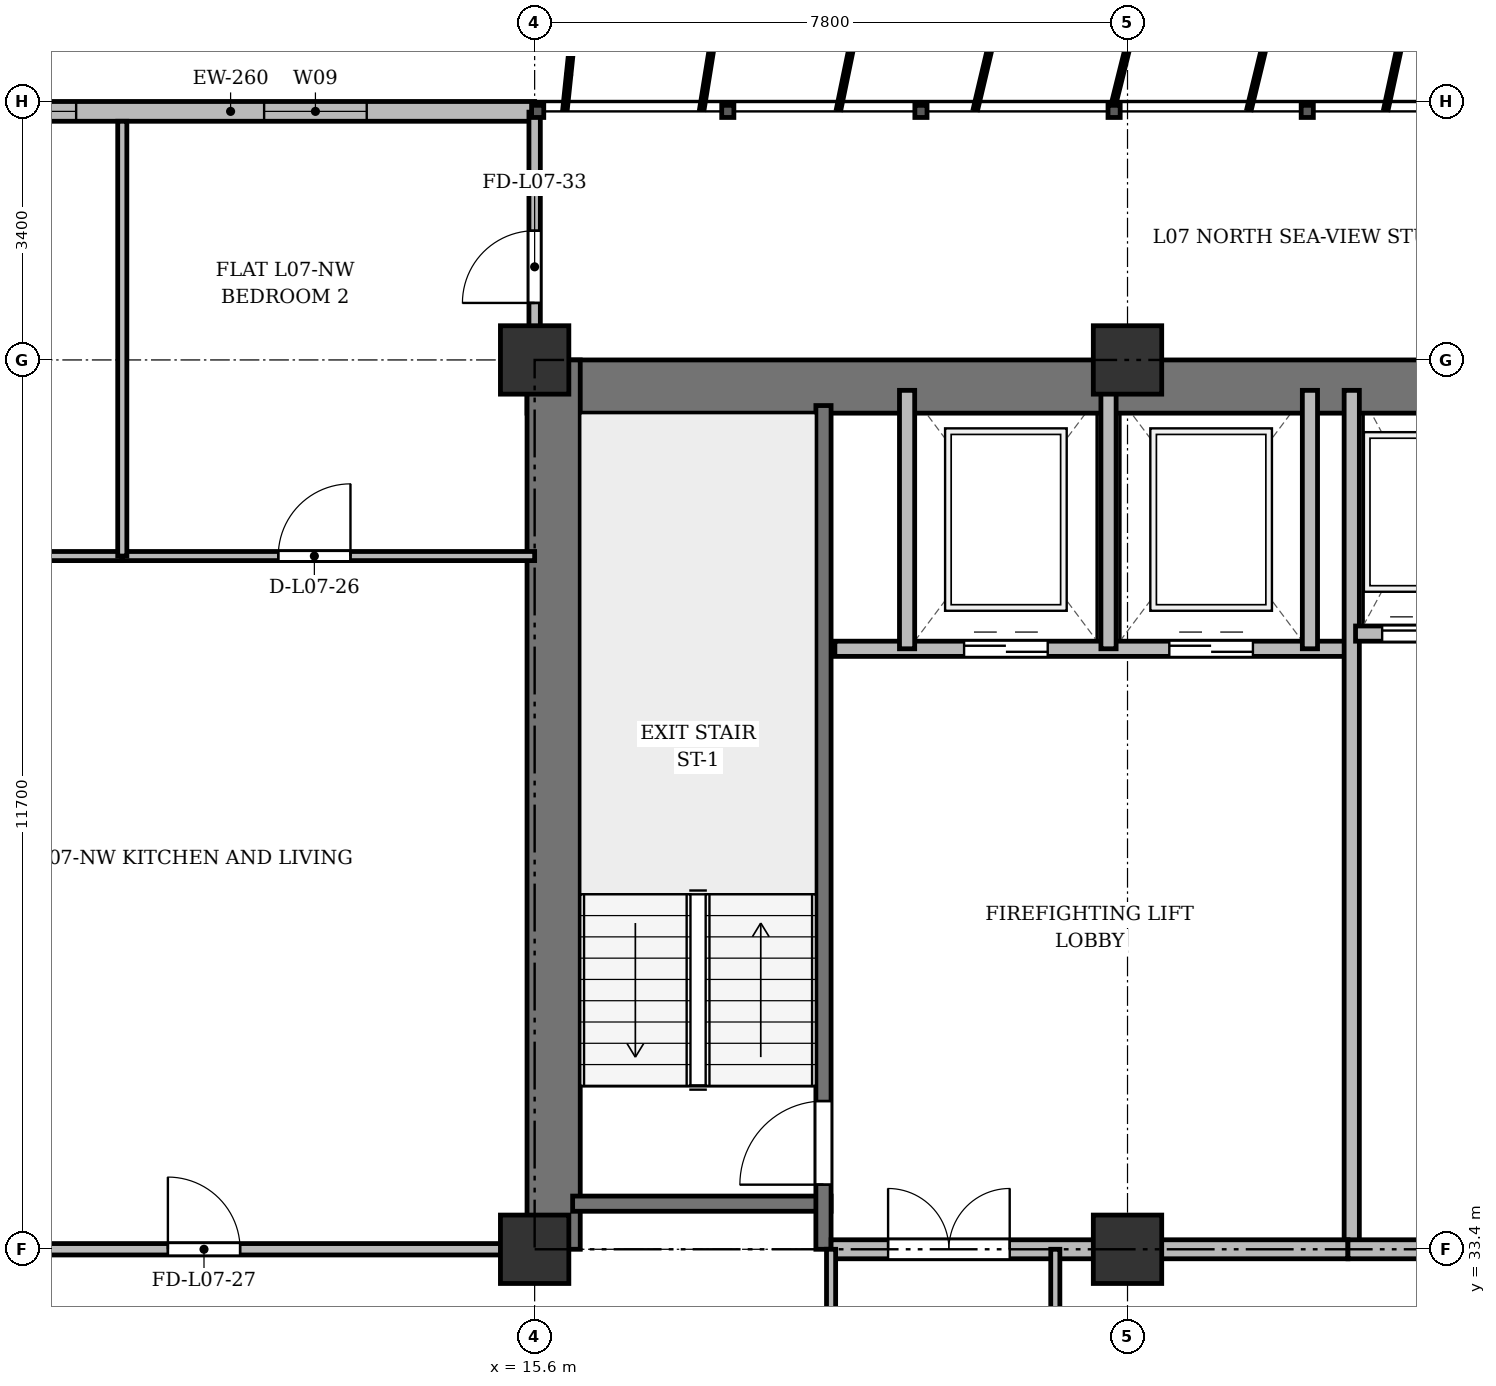
"""IFC4 building model, lengths in metres.
Left out: names, types, materials, properties, quantities, classifications, styles, units other than length and angle.
Written with IfcOpenShell. Run it as: python <this file> out.ifc"""

import sys

from ifc_helpers import new_model, si_unit, direction, frame, frame_2d, origin, origin_2d, place, context, subcontext, project, spatial, rectangle, extrude, source, transform, mapped, element, fill, save


model = new_model("IFC4")
c1 = context("Model", 3, precision=1e-05, world=origin(), true_north=direction((0.0, 1.0)))
c2 = subcontext(c1, "Body", "Model", "MODEL_VIEW")
j1 = project(units=[si_unit("LENGTHUNIT", "METRE"), si_unit("PLANEANGLEUNIT", "RADIAN")], contexts=[c1])
p1 = place(None, origin())
s1 = spatial("IfcSite", under=j1, at=p1, CompositionType="ELEMENT")
p2 = place(p1, origin())
s2 = spatial("IfcBuilding", under=s1, at=p2, CompositionType="ELEMENT")
p3 = place(p2, frame((0.0, 0.0, 30.7)))
s3 = spatial("IfcBuildingStorey", under=s2, at=p3, CompositionType="ELEMENT", Elevation=30.7)
m1 = source(origin(), c2, "Body", "SweptSolid", [
    extrude(rectangle(XDim=0.9, YDim=0.9, at=origin_2d()), origin(), (0.0, 0.0, 1.0), 3.6),
])
for number, where, z_axis, x_axis in (
    (1, (15.6, 33.4, 0.0), (0.0, 0.0, 1.0), (1.0, 0.0, 0.0)),
    (2, (15.6, 45.1, 0.0), (0.0, 0.0, 1.0), (1.0, 0.0, 0.0)),
    (3, (23.4, 33.4, 0.0), (0.0, 0.0, 1.0), (1.0, 0.0, 0.0)),
    (4, (23.4, 45.1, 0.0), (0.0, 0.0, 1.0), (1.0, 0.0, 0.0)),
):
    element("IfcColumn", number, at=place(p3, frame(where, z_axis=z_axis, x_axis=x_axis)), inside=s3, PredefinedType="COLUMN", context=c2, shape_type="MappedRepresentation", body=[
        mapped(m1, transform((0.0, 0.0, 0.0), x_axis=(1.0, 0.0, 0.0), y_axis=(0.0, 1.0, 0.0), z_axis=(0.0, 0.0, 1.0), scale=1.0)),
    ])
p4 = place(p3, frame((7.6, 48.37, 0.0), z_axis=(0.0, 0.0, 1.0), x_axis=(1.0, 0.0, 0.0)))
e5 = element("IfcWall", 5, at=p4, inside=s3, PredefinedType="SOLIDWALL", context=c2, shape_type="SweptSolid", body=[
    extrude(rectangle(XDim=8.0, YDim=0.26, at=frame_2d((4.0, 0.0))), origin(), (0.0, 0.0, 1.0), 3.34),
])
p5 = place(p4, frame((0.768, 0.0, 0.9)))
e6 = element("IfcOpeningElement", 6, at=p5, cuts=e5, PredefinedType="OPENING", context=c2, shape_type="SweptSolid", body=[
    extrude(rectangle(XDim=1.2, YDim=1.65, at=frame_2d((0.6, 0.825))), frame((0.0, 0.14, 0.0), z_axis=(0.0, -1.0, 0.0), x_axis=(1.0, 0.0, 0.0)), (0.0, 0.0, 1.0), 0.28),
])
p6 = place(p4, frame((4.441, 0.0, 0.9)))
e7 = element("IfcOpeningElement", 7, at=p6, cuts=e5, PredefinedType="OPENING", context=c2, shape_type="SweptSolid", body=[
    extrude(rectangle(XDim=1.35, YDim=1.5, at=frame_2d((0.675, 0.75))), frame((0.0, 0.14, 0.0), z_axis=(0.0, -1.0, 0.0), x_axis=(1.0, 0.0, 0.0)), (0.0, 0.0, 1.0), 0.28),
])
p7 = place(p3, frame((15.5, 44.75, 0.0), z_axis=(0.0, 0.0, 1.0), x_axis=(1.0, 0.0, 0.0)))
e8 = element("IfcWall", 8, at=p7, inside=s3, PredefinedType="SHEAR", context=c2, shape_type="SweptSolid", body=[
    extrude(rectangle(XDim=43.4, YDim=0.7, at=frame_2d((21.7, 0.0))), origin(), (0.0, 0.0, 1.0), 3.34),
])
p8 = place(p3, frame((15.85, 33.4, 0.0), z_axis=(0.0, 0.0, 1.0), x_axis=(0.0, 1.0, 0.0)))
e9 = element("IfcWall", 9, at=p8, inside=s3, PredefinedType="SHEAR", context=c2, shape_type="SweptSolid", body=[
    extrude(rectangle(XDim=11.7, YDim=0.7, at=frame_2d((5.85, 0.0))), origin(), (0.0, 0.0, 1.0), 3.34),
])
p9 = place(p3, frame((16.1, 34.0, 0.0), z_axis=(0.0, 0.0, 1.0), x_axis=(1.0, 0.0, 0.0)))
e10 = element("IfcWall", 10, at=p9, inside=s3, PredefinedType="SHEAR", context=c2, shape_type="SweptSolid", body=[
    extrude(rectangle(XDim=3.4, YDim=0.2, at=frame_2d((1.7, 0.0))), origin(), (0.0, 0.0, 1.0), 3.34),
])
p10 = place(p3, frame((19.4, 33.4, 0.0), z_axis=(0.0, 0.0, 1.0), x_axis=(0.0, 1.0, 0.0)))
e11 = element("IfcWall", 11, at=p10, inside=s3, PredefinedType="SHEAR", context=c2, shape_type="SweptSolid", body=[
    extrude(rectangle(XDim=11.1, YDim=0.2, at=frame_2d((5.55, 0.0))), origin(), (0.0, 0.0, 1.0), 3.34),
])
p11 = place(p10, frame((0.85, 0.0, 0.0)))
e12 = element("IfcOpeningElement", 12, at=p11, cuts=e11, PredefinedType="OPENING", context=c2, shape_type="SweptSolid", body=[
    extrude(rectangle(XDim=1.1, YDim=2.15, at=frame_2d((0.55, 1.075))), frame((0.0, 0.11, 0.0), z_axis=(0.0, -1.0, 0.0), x_axis=(1.0, 0.0, 0.0)), (0.0, 0.0, 1.0), 0.22),
])
p12 = place(p3, frame((19.55, 41.3, 0.0), z_axis=(0.0, 0.0, 1.0), x_axis=(1.0, 0.0, 0.0)))
e13 = element("IfcWall", 13, at=p12, inside=s3, PredefinedType="SOLIDWALL", context=c2, shape_type="SweptSolid", body=[
    extrude(rectangle(XDim=6.75, YDim=0.2, at=frame_2d((3.375, 0.0))), origin(), (0.0, 0.0, 1.0), 3.34),
])
p13 = place(p12, frame((1.7, 0.0, 0.0)))
e14 = element("IfcOpeningElement", 14, at=p13, cuts=e13, PredefinedType="OPENING", context=c2, shape_type="SweptSolid", body=[
    extrude(rectangle(XDim=1.1, YDim=2.15, at=frame_2d((0.55, 1.075))), frame((0.0, 0.11, 0.0), z_axis=(0.0, -1.0, 0.0), x_axis=(1.0, 0.0, 0.0)), (0.0, 0.0, 1.0), 0.22),
])
p14 = place(p12, frame((4.4, 0.0, 0.0)))
e15 = element("IfcOpeningElement", 15, at=p14, cuts=e13, PredefinedType="OPENING", context=c2, shape_type="SweptSolid", body=[
    extrude(rectangle(XDim=1.1, YDim=2.15, at=frame_2d((0.55, 1.075))), frame((0.0, 0.11, 0.0), z_axis=(0.0, -1.0, 0.0), x_axis=(1.0, 0.0, 0.0)), (0.0, 0.0, 1.0), 0.22),
])
for number, where, z_axis, x_axis in (
    (16, (20.5, 41.3, 0.0), (0.0, 0.0, 1.0), (0.0, 1.0, 0.0)),
    (17, (23.15, 41.3, 0.0), (0.0, 0.0, 1.0), (0.0, 1.0, 0.0)),
    (18, (25.8, 41.3, 0.0), (0.0, 0.0, 1.0), (0.0, 1.0, 0.0)),
):
    element("IfcWall", number, at=place(p3, frame(where, z_axis=z_axis, x_axis=x_axis)), inside=s3, PredefinedType="SOLIDWALL", context=c2, shape_type="SweptSolid", body=[
        extrude(rectangle(XDim=3.4, YDim=0.2, at=frame_2d((1.7, 0.0))), origin(), (0.0, 0.0, 1.0), 3.34),
    ])
p15 = place(p3, frame((26.35, 33.4, 0.0), z_axis=(0.0, 0.0, 1.0), x_axis=(0.0, 1.0, 0.0)))
e19 = element("IfcWall", 19, at=p15, inside=s3, PredefinedType="SOLIDWALL", context=c2, shape_type="SweptSolid", body=[
    extrude(rectangle(XDim=11.3, YDim=0.2, at=frame_2d((5.65, 0.0))), origin(), (0.0, 0.0, 1.0), 2.69),
])
p16 = place(p3, frame((19.5, 33.4, 0.0), z_axis=(0.0, 0.0, 1.0), x_axis=(1.0, 0.0, 0.0)))
e20 = element("IfcWall", 20, at=p16, inside=s3, PredefinedType="PARTITIONING", context=c2, shape_type="SweptSolid", body=[
    extrude(rectangle(XDim=6.8, YDim=0.25, at=frame_2d((3.4, 0.0))), origin(), (0.0, 0.0, 1.0), 2.69),
])
p17 = place(p16, frame((0.75, 0.0, 0.0)))
e21 = element("IfcOpeningElement", 21, at=p17, cuts=e20, PredefinedType="OPENING", context=c2, shape_type="SweptSolid", body=[
    extrude(rectangle(XDim=1.6, YDim=2.2, at=frame_2d((0.8, 1.1))), frame((0.0, 0.135, 0.0), z_axis=(0.0, -1.0, 0.0), x_axis=(1.0, 0.0, 0.0)), (0.0, 0.0, 1.0), 0.27),
])
p18 = place(p3, frame((26.4, 41.5, 0.0), z_axis=(0.0, 0.0, 1.0), x_axis=(1.0, 0.0, 0.0)))
e22 = element("IfcWall", 22, at=p18, inside=s3, PredefinedType="SOLIDWALL", context=c2, shape_type="SweptSolid", body=[
    extrude(rectangle(XDim=6.95, YDim=0.2, at=frame_2d((3.475, 0.0))), origin(), (0.0, 0.0, 1.0), 3.34),
])
p19 = place(p18, frame((0.35, 0.0, 0.0)))
e23 = element("IfcOpeningElement", 23, at=p19, cuts=e22, PredefinedType="OPENING", context=c2, shape_type="SweptSolid", body=[
    extrude(rectangle(XDim=1.05, YDim=2.15, at=frame_2d((0.525, 1.075))), frame((0.0, 0.11, 0.0), z_axis=(0.0, -1.0, 0.0), x_axis=(1.0, 0.0, 0.0)), (0.0, 0.0, 1.0), 0.22),
])
p20 = place(p18, frame((2.05, 0.0, 0.0)))
e24 = element("IfcOpeningElement", 24, at=p20, cuts=e22, PredefinedType="OPENING", context=c2, shape_type="SweptSolid", body=[
    extrude(rectangle(XDim=1.05, YDim=2.15, at=frame_2d((0.525, 1.075))), frame((0.0, 0.11, 0.0), z_axis=(0.0, -1.0, 0.0), x_axis=(1.0, 0.0, 0.0)), (0.0, 0.0, 1.0), 0.22),
])
p21 = place(p18, frame((3.75, 0.0, 0.0)))
e25 = element("IfcOpeningElement", 25, at=p21, cuts=e22, PredefinedType="OPENING", context=c2, shape_type="SweptSolid", body=[
    extrude(rectangle(XDim=1.05, YDim=2.15, at=frame_2d((0.525, 1.075))), frame((0.0, 0.11, 0.0), z_axis=(0.0, -1.0, 0.0), x_axis=(1.0, 0.0, 0.0)), (0.0, 0.0, 1.0), 0.22),
])
p22 = place(p18, frame((5.45, 0.0, 0.0)))
e26 = element("IfcOpeningElement", 26, at=p22, cuts=e22, PredefinedType="OPENING", context=c2, shape_type="SweptSolid", body=[
    extrude(rectangle(XDim=1.05, YDim=2.15, at=frame_2d((0.525, 1.075))), frame((0.0, 0.11, 0.0), z_axis=(0.0, -1.0, 0.0), x_axis=(1.0, 0.0, 0.0)), (0.0, 0.0, 1.0), 0.22),
])
p23 = place(p3, frame((26.3, 33.4, 0.0), z_axis=(0.0, 0.0, 1.0), x_axis=(1.0, 0.0, 0.0)))
e27 = element("IfcWall", 27, at=p23, inside=s3, PredefinedType="PARTITIONING", context=c2, shape_type="SweptSolid", body=[
    extrude(rectangle(XDim=20.85, YDim=0.25, at=frame_2d((10.425, 0.0))), origin(), (0.0, 0.0, 1.0), 2.69),
])
p24 = place(p23, frame((9.2, 0.0, 0.0)))
e28 = element("IfcOpeningElement", 28, at=p24, cuts=e27, PredefinedType="OPENING", context=c2, shape_type="SweptSolid", body=[
    extrude(rectangle(XDim=1.6, YDim=2.2, at=frame_2d((0.8, 1.1))), frame((0.0, 0.135, 0.0), z_axis=(0.0, -1.0, 0.0), x_axis=(1.0, 0.0, 0.0)), (0.0, 0.0, 1.0), 0.27),
])
for number, where, z_axis, x_axis in (
    (29, (19.5, 29.8, 0.0), (0.0, 0.0, 1.0), (0.0, 1.0, 0.0)),
    (30, (22.45, 29.8, 0.0), (0.0, 0.0, 1.0), (0.0, 1.0, 0.0)),
):
    element("IfcWall", number, at=place(p3, frame(where, z_axis=z_axis, x_axis=x_axis)), inside=s3, PredefinedType="PARTITIONING", context=c2, shape_type="SweptSolid", body=[
        extrude(rectangle(XDim=3.6, YDim=0.12, at=frame_2d((1.8, 0.0))), origin(), (0.0, 0.0, 1.0), 2.69),
    ])
p25 = place(p3, frame((4.75, 42.52, 0.0), z_axis=(0.0, 0.0, 1.0), x_axis=(1.0, 0.0, 0.0)))
e31 = element("IfcWall", 31, at=p25, inside=s3, PredefinedType="PARTITIONING", context=c2, shape_type="SweptSolid", body=[
    extrude(rectangle(XDim=5.425, YDim=0.12, at=frame_2d((2.712, 0.0))), origin(), (0.0, 0.0, 1.0), 2.752),
])
p26 = place(p25, frame((2.423, 0.0, 0.0)))
e32 = element("IfcOpeningElement", 32, at=p26, cuts=e31, PredefinedType="OPENING", context=c2, shape_type="SweptSolid", body=[
    extrude(rectangle(XDim=0.95, YDim=2.15, at=frame_2d((0.475, 1.075))), frame((0.0, 0.07, 0.0), z_axis=(0.0, -1.0, 0.0), x_axis=(1.0, 0.0, 0.0)), (0.0, 0.0, 1.0), 0.14),
])
p27 = place(p3, frame((10.175, 42.52, 0.0), z_axis=(0.0, 0.0, 1.0), x_axis=(1.0, 0.0, 0.0)))
e33 = element("IfcWall", 33, at=p27, inside=s3, PredefinedType="PARTITIONING", context=c2, shape_type="SweptSolid", body=[
    extrude(rectangle(XDim=5.425, YDim=0.12, at=frame_2d((2.712, 0.0))), origin(), (0.0, 0.0, 1.0), 2.752),
])
p28 = place(p27, frame((2.052, 0.0, 0.0)))
e34 = element("IfcOpeningElement", 34, at=p28, cuts=e33, PredefinedType="OPENING", context=c2, shape_type="SweptSolid", body=[
    extrude(rectangle(XDim=0.95, YDim=2.15, at=frame_2d((0.475, 1.075))), frame((0.0, 0.07, 0.0), z_axis=(0.0, -1.0, 0.0), x_axis=(1.0, 0.0, 0.0)), (0.0, 0.0, 1.0), 0.14),
])
p29 = place(p3, frame((10.175, 42.52, 0.0), z_axis=(0.0, 0.0, 1.0), x_axis=(0.0, 1.0, 0.0)))
e35 = element("IfcWall", 35, at=p29, inside=s3, PredefinedType="PARTITIONING", context=c2, shape_type="SweptSolid", body=[
    extrude(rectangle(XDim=5.72, YDim=0.12, at=frame_2d((2.86, 0.0))), origin(), (0.0, 0.0, 1.0), 2.69),
])
p30 = place(p3, frame((4.75, 33.4, 0.0), z_axis=(0.0, 0.0, 1.0), x_axis=(1.0, 0.0, 0.0)))
e36 = element("IfcWall", 36, at=p30, inside=s3, PredefinedType="PARTITIONING", context=c2, shape_type="SweptSolid", body=[
    extrude(rectangle(XDim=10.85, YDim=0.15, at=frame_2d((5.425, 0.0))), origin(), (0.0, 0.0, 1.0), 2.69),
])
p31 = place(p30, frame((6.025, 0.0, 0.0)))
e37 = element("IfcOpeningElement", 37, at=p31, cuts=e36, PredefinedType="OPENING", context=c2, shape_type="SweptSolid", body=[
    extrude(rectangle(XDim=0.95, YDim=2.15, at=frame_2d((0.475, 1.075))), frame((0.0, 0.085, 0.0), z_axis=(0.0, -1.0, 0.0), x_axis=(1.0, 0.0, 0.0)), (0.0, 0.0, 1.0), 0.17),
])
p32 = place(p3, frame((15.6, 44.75, 0.0), z_axis=(0.0, 0.0, 1.0), x_axis=(0.0, 1.0, 0.0)))
e38 = element("IfcWall", 38, at=p32, inside=s3, PredefinedType="PARTITIONING", context=c2, shape_type="SweptSolid", body=[
    extrude(rectangle(XDim=3.61, YDim=0.15, at=frame_2d((1.805, 0.0))), origin(), (0.0, 0.0, 1.0), 2.752),
])
p33 = place(p32, frame((1.1, 0.0, 0.0)))
e39 = element("IfcOpeningElement", 39, at=p33, cuts=e38, PredefinedType="OPENING", context=c2, shape_type="SweptSolid", body=[
    extrude(rectangle(XDim=0.95, YDim=2.15, at=frame_2d((0.475, 1.075))), frame((0.0, 0.085, 0.0), z_axis=(0.0, -1.0, 0.0), x_axis=(1.0, 0.0, 0.0)), (0.0, 0.0, 1.0), 0.17),
])
m2 = source(origin(), c2, "Body", "SweptSolid", [
    extrude(rectangle(XDim=1.2, YDim=1.65, at=frame_2d((0.6, 0.825))), frame((0.0, 0.03, 0.0), z_axis=(0.0, -1.0, 0.0), x_axis=(1.0, 0.0, 0.0)), (0.0, 0.0, 1.0), 0.06),
])
p34 = place(p5, origin())
e40 = element("IfcWindow", 40, at=p34, inside=s3, PartitioningType="SINGLE_PANEL", PredefinedType="WINDOW", context=c2, shape_type="MappedRepresentation", body=[
    mapped(m2, transform((0.0, 0.0, 0.0), x_axis=(1.0, 0.0, 0.0), y_axis=(0.0, 1.0, 0.0), z_axis=(0.0, 0.0, 1.0), scale=1.0)),
])
fill(e6, e40)
m3 = source(origin(), c2, "Body", "SweptSolid", [
    extrude(rectangle(XDim=1.35, YDim=1.5, at=frame_2d((0.675, 0.75))), frame((0.0, 0.03, 0.0), z_axis=(0.0, -1.0, 0.0), x_axis=(1.0, 0.0, 0.0)), (0.0, 0.0, 1.0), 0.06),
])
p35 = place(p6, origin())
e41 = element("IfcWindow", 41, at=p35, inside=s3, PartitioningType="SINGLE_PANEL", PredefinedType="WINDOW", context=c2, shape_type="MappedRepresentation", body=[
    mapped(m3, transform((0.0, 0.0, 0.0), x_axis=(1.0, 0.0, 0.0), y_axis=(0.0, 1.0, 0.0), z_axis=(0.0, 0.0, 1.0), scale=1.0)),
])
fill(e7, e41)
m4 = source(origin(), c2, "Body", "SweptSolid", [
    extrude(rectangle(XDim=1.1, YDim=2.15, at=frame_2d((0.55, 1.075))), frame((0.0, 0.025, 0.0), z_axis=(0.0, -1.0, 0.0), x_axis=(1.0, 0.0, 0.0)), (0.0, 0.0, 1.0), 0.05),
])
p36 = place(p11, origin())
e42 = element("IfcDoor", 42, at=p36, inside=s3, OperationType="SINGLE_SWING_LEFT", PredefinedType="DOOR", context=c2, shape_type="MappedRepresentation", body=[
    mapped(m4, transform((0.0, 0.0, 0.0), x_axis=(1.0, 0.0, 0.0), y_axis=(0.0, 1.0, 0.0), z_axis=(0.0, 0.0, 1.0), scale=1.0)),
])
fill(e12, e42)
p37 = place(p13, origin())
e43 = element("IfcDoor", 43, at=p37, inside=s3, OperationType="DOUBLE_DOOR_SLIDING", PredefinedType="DOOR", context=c2, shape_type="MappedRepresentation", body=[
    mapped(m4, transform((0.0, 0.0, 0.0), x_axis=(1.0, 0.0, 0.0), y_axis=(0.0, 1.0, 0.0), z_axis=(0.0, 0.0, 1.0), scale=1.0)),
])
fill(e14, e43)
p38 = place(p14, origin())
e44 = element("IfcDoor", 44, at=p38, inside=s3, OperationType="DOUBLE_DOOR_SLIDING", PredefinedType="DOOR", context=c2, shape_type="MappedRepresentation", body=[
    mapped(m4, transform((0.0, 0.0, 0.0), x_axis=(1.0, 0.0, 0.0), y_axis=(0.0, 1.0, 0.0), z_axis=(0.0, 0.0, 1.0), scale=1.0)),
])
fill(e15, e44)
m5 = source(origin(), c2, "Body", "SweptSolid", [
    extrude(rectangle(XDim=1.6, YDim=2.2, at=frame_2d((0.8, 1.1))), frame((0.0, 0.025, 0.0), z_axis=(0.0, -1.0, 0.0), x_axis=(1.0, 0.0, 0.0)), (0.0, 0.0, 1.0), 0.05),
])
p39 = place(p17, origin())
e45 = element("IfcDoor", 45, at=p39, inside=s3, OperationType="DOUBLE_DOOR_SINGLE_SWING", PredefinedType="DOOR", context=c2, shape_type="MappedRepresentation", body=[
    mapped(m5, transform((0.0, 0.0, 0.0), x_axis=(1.0, 0.0, 0.0), y_axis=(0.0, 1.0, 0.0), z_axis=(0.0, 0.0, 1.0), scale=1.0)),
])
fill(e21, e45)
m6 = source(origin(), c2, "Body", "SweptSolid", [
    extrude(rectangle(XDim=1.05, YDim=2.15, at=frame_2d((0.525, 1.075))), frame((0.0, 0.025, 0.0), z_axis=(0.0, -1.0, 0.0), x_axis=(1.0, 0.0, 0.0)), (0.0, 0.0, 1.0), 0.05),
])
p40 = place(p19, origin())
e46 = element("IfcDoor", 46, at=p40, inside=s3, OperationType="DOUBLE_DOOR_SLIDING", PredefinedType="DOOR", context=c2, shape_type="MappedRepresentation", body=[
    mapped(m6, transform((0.0, 0.0, 0.0), x_axis=(1.0, 0.0, 0.0), y_axis=(0.0, 1.0, 0.0), z_axis=(0.0, 0.0, 1.0), scale=1.0)),
])
fill(e23, e46)
m7 = source(origin(), c2, "Body", "SweptSolid", [
    extrude(rectangle(XDim=0.95, YDim=2.15, at=frame_2d((0.475, 1.075))), frame((0.0, 0.025, 0.0), z_axis=(0.0, -1.0, 0.0), x_axis=(1.0, 0.0, 0.0)), (0.0, 0.0, 1.0), 0.05),
])
p41 = place(p28, origin())
e47 = element("IfcDoor", 47, at=p41, inside=s3, OperationType="SINGLE_SWING_RIGHT", PredefinedType="DOOR", context=c2, shape_type="MappedRepresentation", body=[
    mapped(m7, transform((0.0, 0.0, 0.0), x_axis=(1.0, 0.0, 0.0), y_axis=(0.0, 1.0, 0.0), z_axis=(0.0, 0.0, 1.0), scale=1.0)),
])
fill(e34, e47)
p42 = place(p31, origin())
e48 = element("IfcDoor", 48, at=p42, inside=s3, OperationType="SINGLE_SWING_LEFT", PredefinedType="DOOR", context=c2, shape_type="MappedRepresentation", body=[
    mapped(m7, transform((0.0, 0.0, 0.0), x_axis=(1.0, 0.0, 0.0), y_axis=(0.0, 1.0, 0.0), z_axis=(0.0, 0.0, 1.0), scale=1.0)),
])
fill(e37, e48)
p43 = place(p33, origin())
e49 = element("IfcDoor", 49, at=p43, inside=s3, OperationType="SINGLE_SWING_LEFT", PredefinedType="DOOR", context=c2, shape_type="MappedRepresentation", body=[
    mapped(m7, transform((0.0, 0.0, 0.0), x_axis=(1.0, 0.0, 0.0), y_axis=(0.0, 1.0, 0.0), z_axis=(0.0, 0.0, 1.0), scale=1.0)),
])
fill(e39, e49)
save(model, sys.argv[1])
